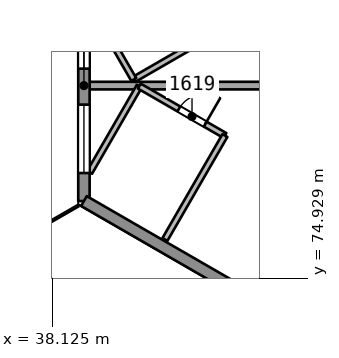
"""IFC4 building model, lengths in metres.
Left out: names, types, materials, properties, quantities, classifications, styles, units other than length and angle.
Written with IfcOpenShell. Run it as: python <this file> out.ifc"""

import sys

from ifc_helpers import new_model, si_unit, direction, frame, frame_2d, origin, place, context, subcontext, project, spatial, rectangle, extrude, element, fill, save


model = new_model("IFC4")
c1 = context("Model", 3, precision=1e-05, world=origin(), true_north=direction((0.0, 1.0)))
c2 = subcontext(c1, "Body", "Model", "MODEL_VIEW")
j1 = project(units=[si_unit("LENGTHUNIT", "METRE"), si_unit("PLANEANGLEUNIT", "RADIAN")], contexts=[c1])
p1 = place(None, origin())
s1 = spatial("IfcSite", under=j1, at=p1, CompositionType="ELEMENT")
p2 = place(p1, origin())
s2 = spatial("IfcBuilding", under=s1, at=p2, CompositionType="ELEMENT")
p3 = place(p2, frame((0.0, 0.0, 72.1)))
s3 = spatial("IfcBuildingStorey", under=s2, at=p3, CompositionType="ELEMENT", Elevation=72.1)
p4 = place(p3, frame((42.525, 81.46, 0.0), z_axis=(0.0, 0.0, 1.0), x_axis=(-0.866021400173, -0.500006934395, 0.0)))
e1 = element("IfcWall", 1, at=p4, inside=s3, PredefinedType="PARTITIONING", context=c2, shape_type="SweptSolid", body=[
    extrude(rectangle(XDim=2.6, YDim=0.15, at=frame_2d((1.3, 0.0))), origin(), (0.0, 0.0, 1.0), 3.2),
])
p5 = place(p3, frame((40.273, 80.16, 0.0), z_axis=(0.0, 0.0, 1.0), x_axis=(-0.500013365158, 0.86601768727, 0.0)))
e2 = element("IfcWall", 2, at=p5, inside=s3, PredefinedType="PARTITIONING", context=c2, shape_type="SweptSolid", body=[
    extrude(rectangle(XDim=2.325, YDim=0.15, at=frame_2d((1.162, 0.0))), origin(), (0.0, 0.0, 1.0), 3.2),
])
p6 = place(p3, frame((39.111, 80.0, 0.0), z_axis=(0.0, 0.0, 1.0), x_axis=(1.0, 0.0, 0.0)))
e3 = element("IfcWall", 3, at=p6, inside=s3, PredefinedType="PARTITIONING", context=c2, shape_type="SweptSolid", body=[
    extrude(rectangle(XDim=9.087, YDim=0.2, at=frame_2d((4.543, 0.0))), origin(), (0.0, 0.0, 1.0), 3.2),
])
p7 = place(p3, frame((39.111, 77.718, 0.0), z_axis=(0.0, 0.0, 1.0), x_axis=(0.500058625179, 0.865991553875, 0.0)))
e4 = element("IfcWall", 4, at=p7, inside=s3, PredefinedType="PARTITIONING", context=c2, shape_type="SweptSolid", body=[
    extrude(rectangle(XDim=2.619, YDim=0.15, at=frame_2d((1.31, 0.0))), origin(), (0.0, 0.0, 1.0), 3.2),
])
p8 = place(p3, frame((40.421, 79.986, 0.0), z_axis=(0.0, 0.0, 1.0), x_axis=(0.86603858612, -0.49997716683, 0.0)))
e5 = element("IfcWall", 5, at=p8, inside=s3, PredefinedType="PARTITIONING", context=c2, shape_type="SweptSolid", body=[
    extrude(rectangle(XDim=2.6, YDim=0.15, at=frame_2d((1.3, 0.0))), origin(), (0.0, 0.0, 1.0), 3.2),
])
p9 = place(p8, frame((1.2, 0.0, 0.0)))
e6 = element("IfcOpeningElement", 6, at=p9, cuts=e5, PredefinedType="OPENING", context=c2, shape_type="SweptSolid", body=[
    extrude(rectangle(XDim=0.8, YDim=2.1, at=frame_2d((0.4, 1.05))), frame((0.0, 0.085, 0.0), z_axis=(0.0, -1.0, 0.0), x_axis=(1.0, 0.0, 0.0)), (0.0, 0.0, 1.0), 0.171),
])
p10 = place(p3, frame((42.672, 78.686, 0.0), z_axis=(0.0, 0.0, 1.0), x_axis=(-0.499963336192, -0.866046570609, 0.0)))
e7 = element("IfcWall", 7, at=p10, inside=s3, PredefinedType="PARTITIONING", context=c2, shape_type="SweptSolid", body=[
    extrude(rectangle(XDim=3.158, YDim=0.15, at=frame_2d((1.579, 0.0))), origin(), (0.0, 0.0, 1.0), 3.2),
])
p11 = place(p3, frame((38.962, 76.962, 0.0), z_axis=(0.0, 0.0, 1.0), x_axis=(0.0, 1.0, 0.0)))
e8 = element("IfcWall", 8, at=p11, inside=s3, PredefinedType="SOLIDWALL", context=c2, shape_type="SweptSolid", body=[
    extrude(rectangle(XDim=6.076, YDim=0.3, at=frame_2d((3.038, 0.0))), origin(), (0.0, 0.0, 1.0), 3.2),
])
p12 = place(p11, frame((3.484, 0.0, 0.9)))
e9 = element("IfcOpeningElement", 9, at=p12, cuts=e8, PredefinedType="OPENING", context=c2, shape_type="SweptSolid", body=[
    extrude(rectangle(XDim=1.8, YDim=1.5, at=frame_2d((0.9, 0.75))), frame((0.0, 0.161, 0.0), z_axis=(0.0, -1.0, 0.0), x_axis=(1.0, 0.0, 0.0)), (0.0, 0.0, 1.0), 0.321),
])
p13 = place(p11, frame((0.738, 0.0, 0.9)))
e10 = element("IfcOpeningElement", 10, at=p13, cuts=e8, PredefinedType="OPENING", context=c2, shape_type="SweptSolid", body=[
    extrude(rectangle(XDim=1.8, YDim=1.5, at=frame_2d((0.9, 0.75))), frame((0.0, 0.161, 0.0), z_axis=(0.0, -1.0, 0.0), x_axis=(1.0, 0.0, 0.0)), (0.0, 0.0, 1.0), 0.321),
])
p14 = place(p3, frame((90.388, 47.271, 0.0), z_axis=(0.0, 0.0, 1.0), x_axis=(-0.866024483997, 0.500001593116, 0.0)))
e11 = element("IfcWall", 11, at=p14, inside=s3, PredefinedType="SOLIDWALL", context=c2, shape_type="SweptSolid", body=[
    extrude(rectangle(XDim=59.381, YDim=0.3, at=frame_2d((29.69, 0.0))), origin(), (0.0, 0.0, 1.0), 3.2),
])
p15 = place(p14, frame((28.802, 0.0, 0.0)))
e12 = element("IfcOpeningElement", 12, at=p15, cuts=e11, PredefinedType="OPENING", context=c2, shape_type="SweptSolid", body=[
    extrude(rectangle(XDim=2.4, YDim=2.4, at=frame_2d((1.2, 1.2))), frame((0.0, 0.161, 0.0), z_axis=(0.0, -1.0, 0.0), x_axis=(1.0, 0.0, 0.0)), (0.0, 0.0, 1.0), 0.321),
])
p16 = place(p14, frame((33.479, 0.0, 0.0)))
e13 = element("IfcOpeningElement", 13, at=p16, cuts=e11, PredefinedType="OPENING", context=c2, shape_type="SweptSolid", body=[
    extrude(rectangle(XDim=2.4, YDim=2.4, at=frame_2d((1.2, 1.2))), frame((0.0, 0.161, 0.0), z_axis=(0.0, -1.0, 0.0), x_axis=(1.0, 0.0, 0.0)), (0.0, 0.0, 1.0), 0.321),
])
p17 = place(p14, frame((46.066, 0.0, 0.0)))
e14 = element("IfcOpeningElement", 14, at=p17, cuts=e11, PredefinedType="OPENING", context=c2, shape_type="SweptSolid", body=[
    extrude(rectangle(XDim=2.4, YDim=2.4, at=frame_2d((1.2, 1.2))), frame((0.0, 0.161, 0.0), z_axis=(0.0, -1.0, 0.0), x_axis=(1.0, 0.0, 0.0)), (0.0, 0.0, 1.0), 0.321),
])
p18 = place(p14, frame((12.823, 0.0, 0.0)))
e15 = element("IfcOpeningElement", 15, at=p18, cuts=e11, PredefinedType="OPENING", context=c2, shape_type="SweptSolid", body=[
    extrude(rectangle(XDim=2.4, YDim=2.4, at=frame_2d((1.2, 1.2))), frame((0.0, 0.161, 0.0), z_axis=(0.0, -1.0, 0.0), x_axis=(1.0, 0.0, 0.0)), (0.0, 0.0, 1.0), 0.321),
])
p19 = place(p9, origin())
e16 = element("IfcDoor", 16, at=p19, inside=s3, OperationType="SINGLE_SWING_RIGHT", PredefinedType="NOTDEFINED", context=c2, shape_type="SweptSolid", body=[
    extrude(rectangle(XDim=0.8, YDim=2.1, at=frame_2d((0.4, 1.05))), frame((0.0, 0.025, 0.0), z_axis=(0.0, -1.0, 0.0), x_axis=(1.0, 0.0, 0.0)), (0.0, 0.0, 1.0), 0.05),
])
fill(e6, e16)
p20 = place(p12, origin())
e17 = element("IfcWindow", 17, at=p20, inside=s3, PartitioningType="SINGLE_PANEL", PredefinedType="WINDOW", context=c2, shape_type="SweptSolid", body=[
    extrude(rectangle(XDim=1.8, YDim=1.5, at=frame_2d((0.9, 0.75))), frame((0.0, 0.03, 0.0), z_axis=(0.0, -1.0, 0.0), x_axis=(1.0, 0.0, 0.0)), (0.0, 0.0, 1.0), 0.06),
])
fill(e9, e17)
p21 = place(p13, origin())
e18 = element("IfcWindow", 18, at=p21, inside=s3, PartitioningType="SINGLE_PANEL", PredefinedType="WINDOW", context=c2, shape_type="SweptSolid", body=[
    extrude(rectangle(XDim=1.8, YDim=1.5, at=frame_2d((0.9, 0.75))), frame((0.0, 0.03, 0.0), z_axis=(0.0, -1.0, 0.0), x_axis=(1.0, 0.0, 0.0)), (0.0, 0.0, 1.0), 0.06),
])
fill(e10, e18)
save(model, sys.argv[1])
